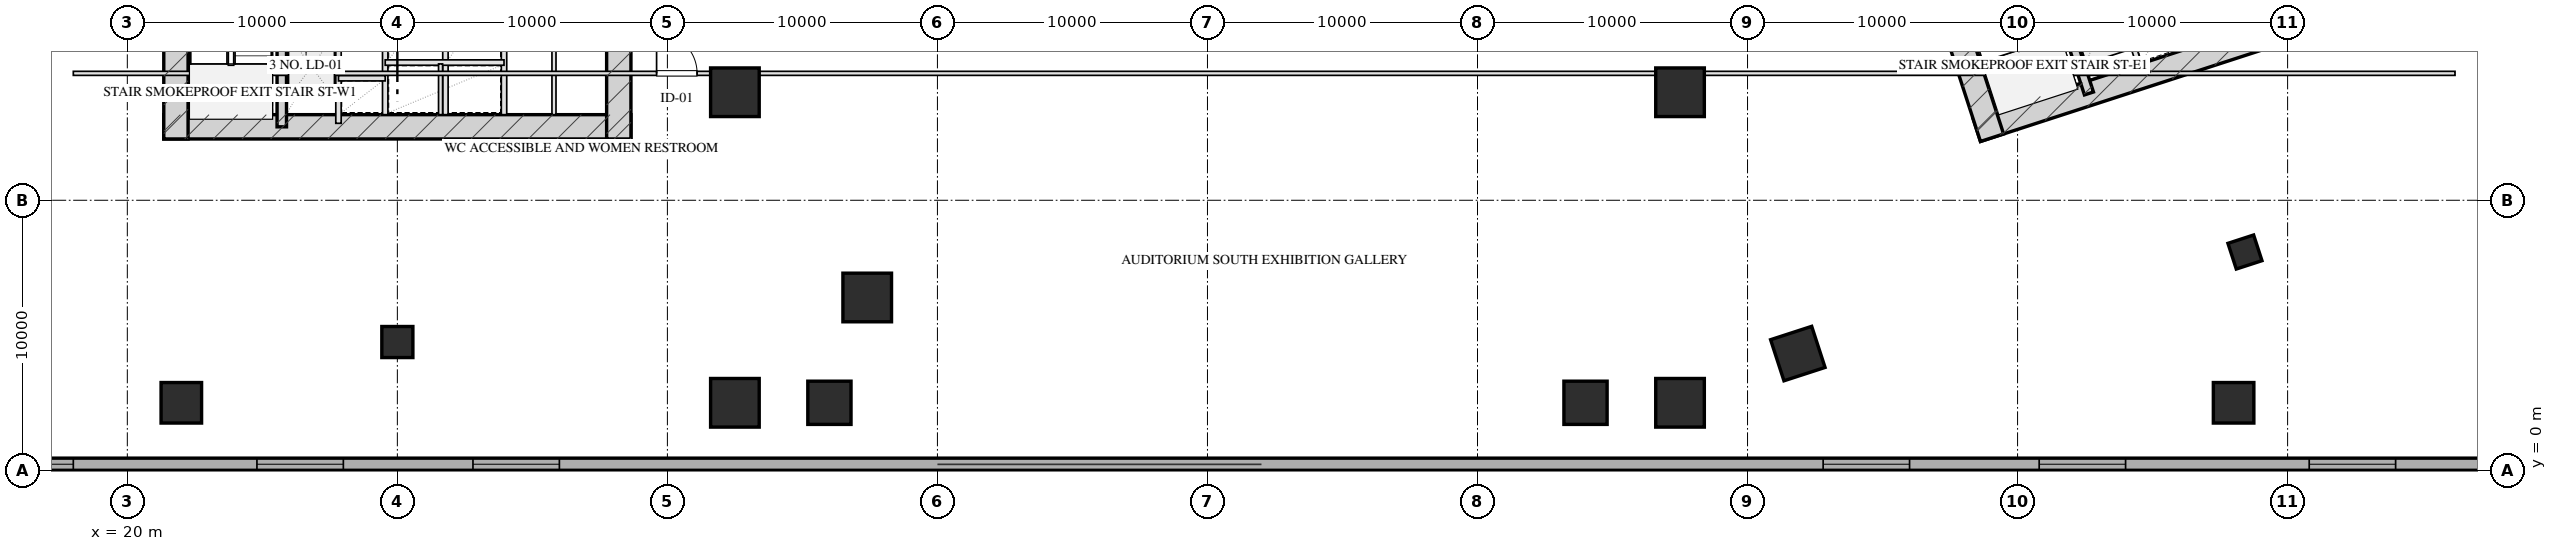
"""IFC4 building model, lengths in metres.
Left out: names, types, materials, properties, quantities, classifications, styles, units other than length and angle.
Written with IfcOpenShell. Run it as: python <this file> out.ifc"""

import sys

from ifc_helpers import new_model, si_unit, direction, frame, frame_2d, origin, origin_2d, place, context, subcontext, project, spatial, rectangle, hollow_rectangle, extrude, element, fill, save


model = new_model("IFC4")
c1 = context("Model", 3, precision=1e-05, world=origin(), true_north=direction((0.0, 1.0)))
c2 = subcontext(c1, "Body", "Model", "MODEL_VIEW")
j1 = project(units=[si_unit("LENGTHUNIT", "METRE"), si_unit("PLANEANGLEUNIT", "RADIAN")], contexts=[c1])
p1 = place(None, origin())
s1 = spatial("IfcSite", under=j1, at=p1, CompositionType="ELEMENT")
p2 = place(p1, origin())
s2 = spatial("IfcBuilding", under=s1, at=p2, CompositionType="ELEMENT")
p3 = place(p2, frame((0.0, 0.0, 6.0)))
s3 = spatial("IfcBuildingStorey", under=s2, at=p3, CompositionType="ELEMENT", Elevation=6.0)
p4 = place(p3, frame((21.35, 12.72, 0.0), z_axis=(0.0, 0.0, 1.0), x_axis=(1.0, 0.0, 0.0)))
e1 = element("IfcWall", 1, at=p4, inside=s3, PredefinedType="SHEAR", context=c2, shape_type="SweptSolid", body=[
    extrude(rectangle(XDim=17.3, YDim=0.9, at=frame_2d((8.65, 0.0))), origin(), (0.0, 0.0, 1.0), 5.5),
])
for number, where, z_axis, x_axis in (
    (2, (21.8, 22.05, 0.0), (0.0, 0.0, 1.0), (0.0, -1.0, 0.0)),
    (3, (38.2, 22.05, 0.0), (0.0, 0.0, 1.0), (0.0, -1.0, 0.0)),
):
    element("IfcWall", number, at=place(p3, frame(where, z_axis=z_axis, x_axis=x_axis)), inside=s3, PredefinedType="SHEAR", context=c2, shape_type="SweptSolid", body=[
        extrude(rectangle(XDim=9.78, YDim=0.9, at=frame_2d((4.89, 0.0))), origin(), (0.0, 0.0, 1.0), 5.5),
    ])
p5 = place(p3, frame((25.72, 19.7, 0.0), z_axis=(0.0, 0.0, 1.0), x_axis=(0.0, -1.0, 0.0)))
e4 = element("IfcWall", 4, at=p5, inside=s3, PredefinedType="SHEAR", context=c2, shape_type="SweptSolid", body=[
    extrude(rectangle(XDim=6.98, YDim=0.35, at=frame_2d((3.49, 0.0))), origin(), (0.0, 0.0, 1.0), 5.5),
])
p6 = place(p3, frame((88.487, 12.605, 0.0), z_axis=(0.0, 0.0, 1.0), x_axis=(0.951055016115, 0.309021611416, 0.0)))
e5 = element("IfcWall", 5, at=p6, inside=s3, PredefinedType="SHEAR", context=c2, shape_type="SweptSolid", body=[
    extrude(rectangle(XDim=16.7, YDim=0.9, at=frame_2d((8.35, 0.0))), origin(), (0.0, 0.0, 1.0), 5.5),
])
p7 = place(p3, frame((86.032, 21.618, 0.0), z_axis=(0.0, 0.0, 1.0), x_axis=(0.30901438634, -0.951057363693, 0.0)))
e6 = element("IfcWall", 6, at=p7, inside=s3, PredefinedType="SHEAR", context=c2, shape_type="SweptSolid", body=[
    extrude(rectangle(XDim=9.78, YDim=0.9, at=frame_2d((4.89, 0.0))), origin(), (0.0, 0.0, 1.0), 5.5),
])
p8 = place(p3, frame((90.486, 20.594, 0.0), z_axis=(0.0, 0.0, 1.0), x_axis=(0.309020428229, -0.951055400562, 0.0)))
e7 = element("IfcWall", 7, at=p8, inside=s3, PredefinedType="SHEAR", context=c2, shape_type="SweptSolid", body=[
    extrude(rectangle(XDim=6.98, YDim=0.35, at=frame_2d((3.49, 0.0))), origin(), (0.0, 0.0, 1.0), 5.5),
])
p9 = place(p3, frame((22.0, 2.5, 0.0), z_axis=(0.0, 0.0, 1.0), x_axis=(1.0, 0.0, 0.0)))
e8 = element("IfcColumn", 8, at=p9, inside=s3, PredefinedType="COLUMN", context=c2, shape_type="SweptSolid", body=[
    extrude(rectangle(XDim=1.5, YDim=1.5, at=origin_2d()), origin(), (0.0, 0.0, 1.0), 5.501),
])
for number, where, z_axis, x_axis in (
    (9, (42.5, 2.5, 0.0), (0.0, 0.0, 1.0), (1.0, 0.0, 0.0)),
    (10, (42.5, 14.0, 0.0), (0.0, 0.0, 1.0), (1.0, 0.0, 0.0)),
    (11, (77.5, 2.5, 0.0), (0.0, 0.0, 1.0), (1.0, 0.0, 0.0)),
    (12, (77.5, 14.0, 0.0), (0.0, 0.0, 1.0), (1.0, 0.0, 0.0)),
):
    element("IfcColumn", number, at=place(p3, frame(where, z_axis=z_axis, x_axis=x_axis)), inside=s3, PredefinedType="COLUMN", context=c2, shape_type="SweptSolid", body=[
        extrude(hollow_rectangle(XDim=1.8, YDim=1.8, WallThickness=0.06, at=origin_2d()), origin(), (0.0, 0.0, 1.0), 5.501),
    ])
p10 = place(p3, frame((98.0, 2.5, 0.0), z_axis=(0.0, 0.0, 1.0), x_axis=(1.0, 0.0, 0.0)))
e13 = element("IfcColumn", 13, at=p10, inside=s3, PredefinedType="COLUMN", context=c2, shape_type="SweptSolid", body=[
    extrude(rectangle(XDim=1.5, YDim=1.5, at=origin_2d()), origin(), (0.0, 0.0, 1.0), 5.501),
])
for number, where, z_axis, x_axis in (
    (14, (46.0, 2.5, 0.0), (0.0, 0.0, 1.0), (1.0, 0.0, 0.0)),
    (15, (74.0, 2.5, 0.0), (0.0, 0.0, 1.0), (1.0, 0.0, 0.0)),
):
    element("IfcColumn", number, at=place(p3, frame(where, z_axis=z_axis, x_axis=x_axis)), inside=s3, PredefinedType="COLUMN", context=c2, shape_type="SweptSolid", body=[
        extrude(hollow_rectangle(XDim=1.6, YDim=1.6, WallThickness=0.055, at=origin_2d()), origin(), (0.0, 0.0, 1.0), 5.501),
    ])
p11 = place(p3, frame((47.4, 6.4, 0.0), z_axis=(0.0, 0.0, 1.0), x_axis=(1.0, 0.0, 0.0)))
e16 = element("IfcColumn", 16, at=p11, inside=s3, PredefinedType="COLUMN", context=c2, shape_type="SweptSolid", body=[
    extrude(hollow_rectangle(XDim=1.8, YDim=1.8, WallThickness=0.06, at=origin_2d()), origin(), (0.0, 0.0, 1.0), 5.501),
])
p12 = place(p3, frame((30.0, 4.75, 0.0), z_axis=(0.0, 0.0, 1.0), x_axis=(1.0, 0.0, 0.0)))
e17 = element("IfcColumn", 17, at=p12, inside=s3, PredefinedType="COLUMN", context=c2, shape_type="SweptSolid", body=[
    extrude(hollow_rectangle(XDim=1.15, YDim=1.15, WallThickness=0.04, at=origin_2d()), origin(), (0.0, 0.0, 1.0), 5.501),
])
p13 = place(p3, frame((81.863, 4.323, 0.0), z_axis=(0.0, 0.0, 1.0), x_axis=(0.951056516295, 0.309016994375, 0.0)))
e18 = element("IfcColumn", 18, at=p13, inside=s3, PredefinedType="COLUMN", context=c2, shape_type="SweptSolid", body=[
    extrude(hollow_rectangle(XDim=1.6, YDim=1.6, WallThickness=0.055, at=origin_2d()), origin(), (0.0, 0.0, 1.0), 5.501),
])
p14 = place(p3, frame((98.421, 8.084, 0.0), z_axis=(0.0, 0.0, 1.0), x_axis=(0.951056516295, 0.309016994375, 0.0)))
e19 = element("IfcColumn", 19, at=p14, inside=s3, PredefinedType="COLUMN", context=c2, shape_type="SweptSolid", body=[
    extrude(hollow_rectangle(XDim=1.0, YDim=1.0, WallThickness=0.036, at=origin_2d()), origin(), (0.0, 0.0, 1.0), 5.501),
])
p15 = place(p3, frame((120.0, 0.225, 0.0), z_axis=(0.0, 0.0, 1.0), x_axis=(-1.0, 0.0, 0.0)))
e20 = element("IfcWall", 20, at=p15, inside=s3, PredefinedType="SOLIDWALL", context=c2, shape_type="SweptSolid", body=[
    extrude(rectangle(XDim=120.0, YDim=0.45, at=frame_2d((60.0, 0.0))), origin(), (0.0, 0.0, 1.0), 5.2),
])
p16 = place(p15, frame((8.0, 0.0, 0.7)))
e21 = element("IfcOpeningElement", 21, at=p16, cuts=e20, PredefinedType="OPENING", context=c2, shape_type="SweptSolid", body=[
    extrude(rectangle(XDim=3.2, YDim=2.05, at=frame_2d((1.6, 1.025))), frame((0.0, 0.235, 0.0), z_axis=(0.0, -1.0, 0.0), x_axis=(1.0, 0.0, 0.0)), (0.0, 0.0, 1.0), 0.47),
])
p17 = place(p15, frame((16.0, 0.0, 0.7)))
e22 = element("IfcOpeningElement", 22, at=p17, cuts=e20, PredefinedType="OPENING", context=c2, shape_type="SweptSolid", body=[
    extrude(rectangle(XDim=3.2, YDim=2.05, at=frame_2d((1.6, 1.025))), frame((0.0, 0.235, 0.0), z_axis=(0.0, -1.0, 0.0), x_axis=(1.0, 0.0, 0.0)), (0.0, 0.0, 1.0), 0.47),
])
p18 = place(p15, frame((26.0, 0.0, 0.7)))
e23 = element("IfcOpeningElement", 23, at=p18, cuts=e20, PredefinedType="OPENING", context=c2, shape_type="SweptSolid", body=[
    extrude(rectangle(XDim=3.2, YDim=2.05, at=frame_2d((1.6, 1.025))), frame((0.0, 0.235, 0.0), z_axis=(0.0, -1.0, 0.0), x_axis=(1.0, 0.0, 0.0)), (0.0, 0.0, 1.0), 0.47),
])
p19 = place(p15, frame((34.0, 0.0, 0.7)))
e24 = element("IfcOpeningElement", 24, at=p19, cuts=e20, PredefinedType="OPENING", context=c2, shape_type="SweptSolid", body=[
    extrude(rectangle(XDim=3.2, YDim=2.05, at=frame_2d((1.6, 1.025))), frame((0.0, 0.235, 0.0), z_axis=(0.0, -1.0, 0.0), x_axis=(1.0, 0.0, 0.0)), (0.0, 0.0, 1.0), 0.47),
])
p20 = place(p15, frame((84.0, 0.0, 0.7)))
e25 = element("IfcOpeningElement", 25, at=p20, cuts=e20, PredefinedType="OPENING", context=c2, shape_type="SweptSolid", body=[
    extrude(rectangle(XDim=3.2, YDim=2.05, at=frame_2d((1.6, 1.025))), frame((0.0, 0.235, 0.0), z_axis=(0.0, -1.0, 0.0), x_axis=(1.0, 0.0, 0.0)), (0.0, 0.0, 1.0), 0.47),
])
p21 = place(p15, frame((92.0, 0.0, 0.7)))
e26 = element("IfcOpeningElement", 26, at=p21, cuts=e20, PredefinedType="OPENING", context=c2, shape_type="SweptSolid", body=[
    extrude(rectangle(XDim=3.2, YDim=2.05, at=frame_2d((1.6, 1.025))), frame((0.0, 0.235, 0.0), z_axis=(0.0, -1.0, 0.0), x_axis=(1.0, 0.0, 0.0)), (0.0, 0.0, 1.0), 0.47),
])
p22 = place(p15, frame((102.0, 0.0, 0.7)))
e27 = element("IfcOpeningElement", 27, at=p22, cuts=e20, PredefinedType="OPENING", context=c2, shape_type="SweptSolid", body=[
    extrude(rectangle(XDim=3.2, YDim=2.05, at=frame_2d((1.6, 1.025))), frame((0.0, 0.235, 0.0), z_axis=(0.0, -1.0, 0.0), x_axis=(1.0, 0.0, 0.0)), (0.0, 0.0, 1.0), 0.47),
])
p23 = place(p15, frame((110.0, 0.0, 0.7)))
e28 = element("IfcOpeningElement", 28, at=p23, cuts=e20, PredefinedType="OPENING", context=c2, shape_type="SweptSolid", body=[
    extrude(rectangle(XDim=3.2, YDim=2.05, at=frame_2d((1.6, 1.025))), frame((0.0, 0.235, 0.0), z_axis=(0.0, -1.0, 0.0), x_axis=(1.0, 0.0, 0.0)), (0.0, 0.0, 1.0), 0.47),
])
p24 = place(p3, frame((29.55, 21.6, 0.0), z_axis=(0.0, 0.0, 1.0), x_axis=(0.0, -1.0, 0.0)))
e29 = element("IfcWall", 29, at=p24, inside=s3, PredefinedType="PARTITIONING", context=c2, shape_type="SweptSolid", body=[
    extrude(rectangle(XDim=8.43, YDim=0.2, at=frame_2d((4.215, 0.0))), origin(), (0.0, 0.0, 1.0), 5.185),
])
p25 = place(p3, frame((27.82, 16.55, 0.0), z_axis=(0.0, 0.0, 1.0), x_axis=(0.0, -1.0, 0.0)))
e30 = element("IfcWall", 30, at=p25, inside=s3, PredefinedType="PARTITIONING", context=c2, shape_type="SweptSolid", body=[
    extrude(rectangle(XDim=3.7, YDim=0.2, at=frame_2d((1.85, 0.0))), origin(), (0.0, 0.0, 1.0), 5.185),
])
p26 = place(p3, frame((27.82, 14.52, 0.0), z_axis=(0.0, 0.0, 1.0), x_axis=(1.0, 0.0, 0.0)))
e31 = element("IfcWall", 31, at=p26, inside=s3, PredefinedType="PARTITIONING", context=c2, shape_type="SweptSolid", body=[
    extrude(rectangle(XDim=1.73, YDim=0.2, at=frame_2d((0.865, 0.0))), origin(), (0.0, 0.0, 1.0), 5.185),
])
p27 = place(p3, frame((33.95, 21.6, 0.0), z_axis=(0.0, 0.0, 1.0), x_axis=(0.0, -1.0, 0.0)))
e32 = element("IfcWall", 32, at=p27, inside=s3, PredefinedType="PARTITIONING", context=c2, shape_type="SweptSolid", body=[
    extrude(rectangle(XDim=8.43, YDim=0.2, at=frame_2d((4.215, 0.0))), origin(), (0.0, 0.0, 1.0), 5.185),
])
p28 = place(p3, frame((31.78, 18.12, 0.0), z_axis=(0.0, 0.0, 1.0), x_axis=(0.0, -1.0, 0.0)))
e33 = element("IfcWall", 33, at=p28, inside=s3, PredefinedType="PARTITIONING", context=c2, shape_type="SweptSolid", body=[
    extrude(rectangle(XDim=4.95, YDim=0.2, at=frame_2d((2.475, 0.0))), origin(), (0.0, 0.0, 1.0), 5.185),
])
p29 = place(p3, frame((29.55, 15.1, 0.0), z_axis=(0.0, 0.0, 1.0), x_axis=(1.0, 0.0, 0.0)))
e34 = element("IfcWall", 34, at=p29, inside=s3, PredefinedType="PARTITIONING", context=c2, shape_type="SweptSolid", body=[
    extrude(rectangle(XDim=4.4, YDim=0.2, at=frame_2d((2.2, 0.0))), origin(), (0.0, 0.0, 1.0), 5.185),
])
p30 = place(p3, frame((31.6, 15.05, 0.0), z_axis=(0.0, 0.0, 1.0), x_axis=(0.0, -1.0, 0.0)))
e35 = element("IfcWall", 35, at=p30, inside=s3, PredefinedType="PARTITIONING", context=c2, shape_type="SweptSolid", body=[
    extrude(rectangle(XDim=1.88, YDim=0.15, at=frame_2d((0.94, 0.0))), origin(), (0.0, 0.0, 1.0), 5.185),
])
p31 = place(p3, frame((35.8, 18.9, 0.0), z_axis=(0.0, 0.0, 1.0), x_axis=(0.0, -1.0, 0.0)))
e36 = element("IfcWall", 36, at=p31, inside=s3, PredefinedType="PARTITIONING", context=c2, shape_type="SweptSolid", body=[
    extrude(rectangle(XDim=5.73, YDim=0.15, at=frame_2d((2.865, 0.0))), origin(), (0.0, 0.0, 1.0), 5.185),
])
p32 = place(p3, frame((93.457, 18.247, 0.0), z_axis=(0.0, 0.0, 1.0), x_axis=(0.3089935693, -0.951064127245, 0.0)))
e37 = element("IfcWall", 37, at=p32, inside=s3, PredefinedType="PARTITIONING", context=c2, shape_type="SweptSolid", body=[
    extrude(rectangle(XDim=3.7, YDim=0.2, at=frame_2d((1.85, 0.0))), origin(), (0.0, 0.0, 1.0), 5.185),
])
p33 = place(p3, frame((18.0, 14.7, 0.0), z_axis=(0.0, 0.0, 1.0), x_axis=(1.0, 0.0, 0.0)))
e38 = element("IfcWall", 38, at=p33, inside=s3, PredefinedType="PARTITIONING", context=c2, shape_type="SweptSolid", body=[
    extrude(rectangle(XDim=88.2, YDim=0.15, at=frame_2d((44.1, 0.0))), origin(), (0.0, 0.0, 1.0), 2.325),
])
p34 = place(p33, frame((21.6, 0.0, 0.0)))
e39 = element("IfcOpeningElement", 39, at=p34, cuts=e38, PredefinedType="OPENING", context=c2, shape_type="SweptSolid", body=[
    extrude(rectangle(XDim=1.5, YDim=2.05, at=frame_2d((0.75, 1.025))), frame((0.0, 0.085, 0.0), z_axis=(0.0, -1.0, 0.0), x_axis=(1.0, 0.0, 0.0)), (0.0, 0.0, 1.0), 0.17),
])
p35 = place(p17, origin())
e40 = element("IfcWindow", 40, at=p35, inside=s3, PartitioningType="TRIPLE_PANEL_VERTICAL", PredefinedType="WINDOW", context=c2, shape_type="SweptSolid", body=[
    extrude(rectangle(XDim=3.2, YDim=2.05, at=frame_2d((1.6, 1.025))), frame((0.0, 0.03, 0.0), z_axis=(0.0, -1.0, 0.0), x_axis=(1.0, 0.0, 0.0)), (0.0, 0.0, 1.0), 0.06),
])
fill(e22, e40)
p36 = place(p18, origin())
e41 = element("IfcWindow", 41, at=p36, inside=s3, PartitioningType="TRIPLE_PANEL_VERTICAL", PredefinedType="WINDOW", context=c2, shape_type="SweptSolid", body=[
    extrude(rectangle(XDim=3.2, YDim=2.05, at=frame_2d((1.6, 1.025))), frame((0.0, 0.03, 0.0), z_axis=(0.0, -1.0, 0.0), x_axis=(1.0, 0.0, 0.0)), (0.0, 0.0, 1.0), 0.06),
])
fill(e23, e41)
p37 = place(p19, origin())
e42 = element("IfcWindow", 42, at=p37, inside=s3, PartitioningType="TRIPLE_PANEL_VERTICAL", PredefinedType="WINDOW", context=c2, shape_type="SweptSolid", body=[
    extrude(rectangle(XDim=3.2, YDim=2.05, at=frame_2d((1.6, 1.025))), frame((0.0, 0.03, 0.0), z_axis=(0.0, -1.0, 0.0), x_axis=(1.0, 0.0, 0.0)), (0.0, 0.0, 1.0), 0.06),
])
fill(e24, e42)
p38 = place(p20, origin())
e43 = element("IfcWindow", 43, at=p38, inside=s3, PartitioningType="TRIPLE_PANEL_VERTICAL", PredefinedType="WINDOW", context=c2, shape_type="SweptSolid", body=[
    extrude(rectangle(XDim=3.2, YDim=2.05, at=frame_2d((1.6, 1.025))), frame((0.0, 0.03, 0.0), z_axis=(0.0, -1.0, 0.0), x_axis=(1.0, 0.0, 0.0)), (0.0, 0.0, 1.0), 0.06),
])
fill(e25, e43)
p39 = place(p21, origin())
e44 = element("IfcWindow", 44, at=p39, inside=s3, PartitioningType="TRIPLE_PANEL_VERTICAL", PredefinedType="WINDOW", context=c2, shape_type="SweptSolid", body=[
    extrude(rectangle(XDim=3.2, YDim=2.05, at=frame_2d((1.6, 1.025))), frame((0.0, 0.03, 0.0), z_axis=(0.0, -1.0, 0.0), x_axis=(1.0, 0.0, 0.0)), (0.0, 0.0, 1.0), 0.06),
])
fill(e26, e44)
p40 = place(p22, origin())
e45 = element("IfcWindow", 45, at=p40, inside=s3, PartitioningType="TRIPLE_PANEL_VERTICAL", PredefinedType="WINDOW", context=c2, shape_type="SweptSolid", body=[
    extrude(rectangle(XDim=3.2, YDim=2.05, at=frame_2d((1.6, 1.025))), frame((0.0, 0.03, 0.0), z_axis=(0.0, -1.0, 0.0), x_axis=(1.0, 0.0, 0.0)), (0.0, 0.0, 1.0), 0.06),
])
fill(e27, e45)
p41 = place(p34, origin())
e46 = element("IfcDoor", 46, at=p41, inside=s3, OperationType="SINGLE_SWING_LEFT", PredefinedType="DOOR", context=c2, shape_type="SweptSolid", body=[
    extrude(rectangle(XDim=1.5, YDim=2.05, at=frame_2d((0.75, 1.025))), frame((0.0, 0.025, 0.0), z_axis=(0.0, -1.0, 0.0), x_axis=(1.0, 0.0, 0.0)), (0.0, 0.0, 1.0), 0.05),
])
fill(e39, e46)
save(model, sys.argv[1])
